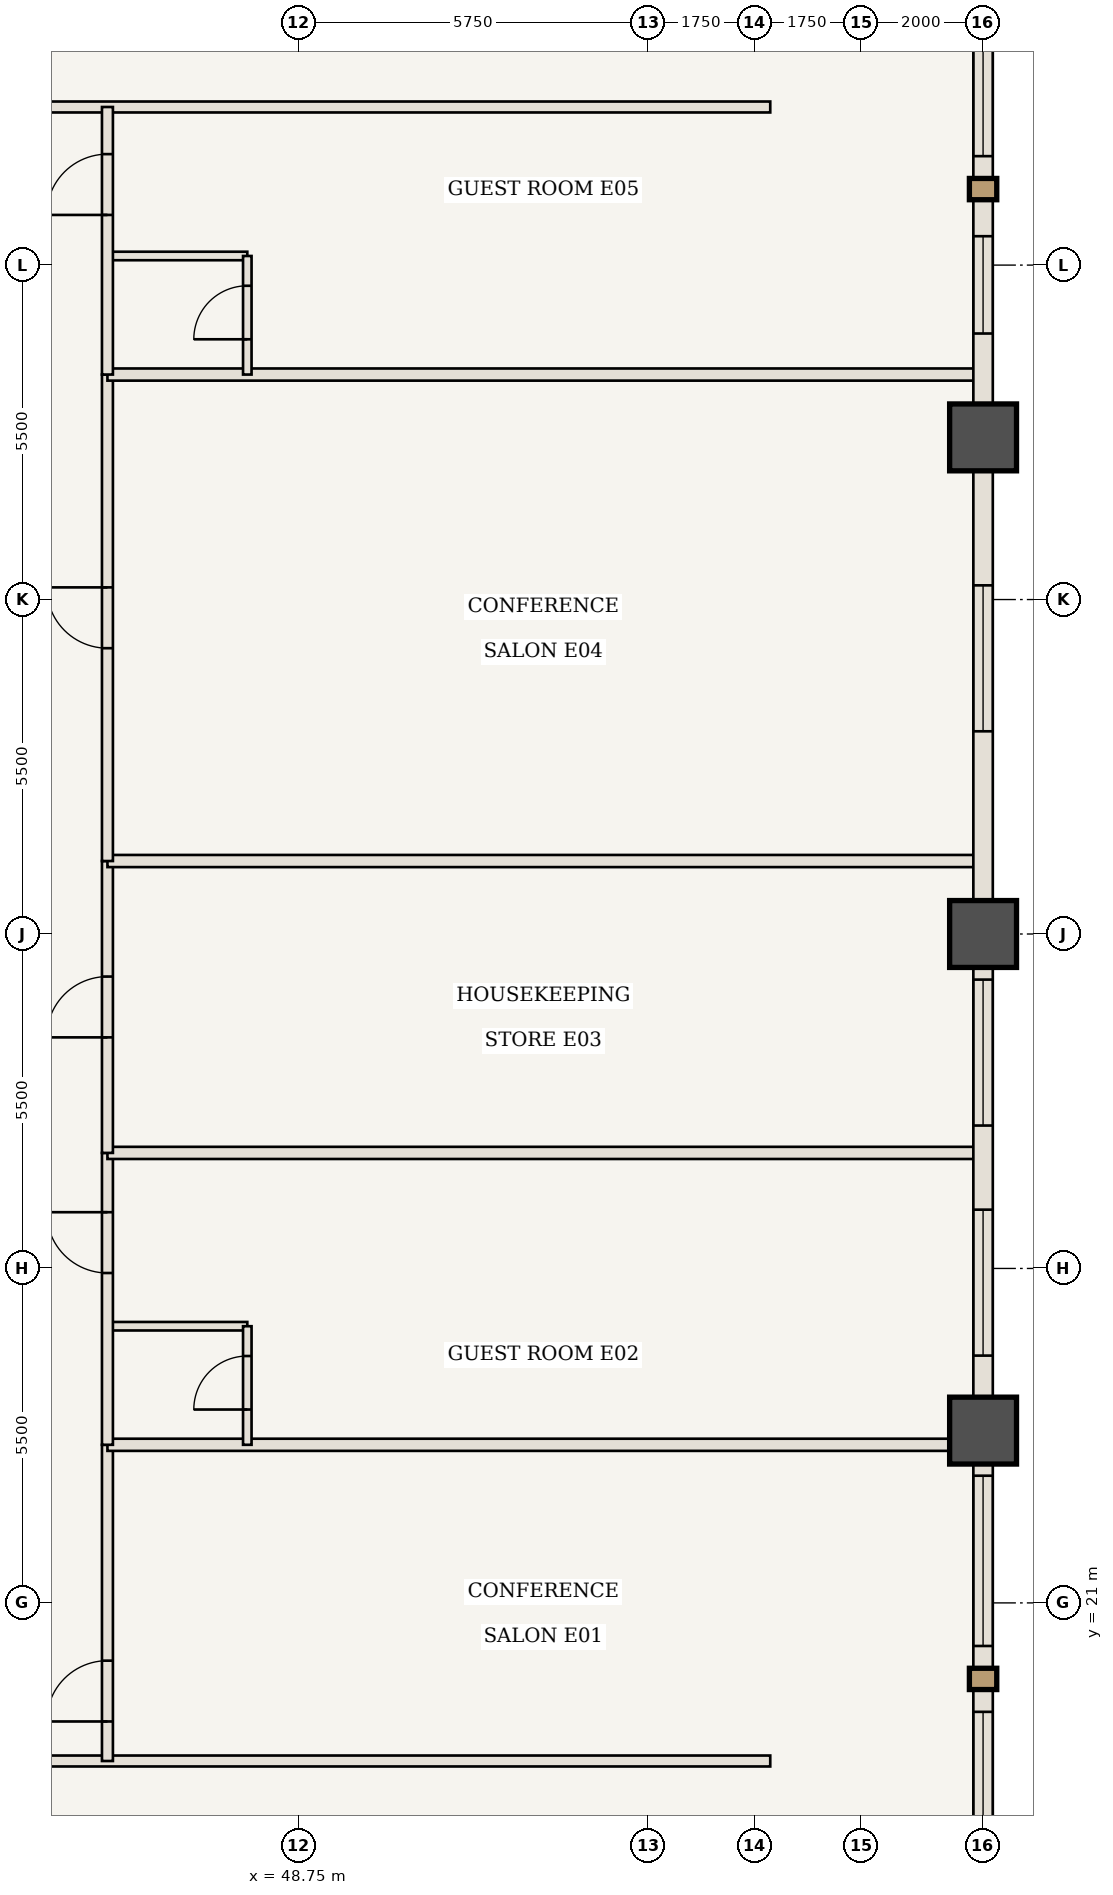
"""IFC4 building model, lengths in metres.
Left out: names, types, materials, properties, quantities, classifications, styles, units other than length and angle.
Written with IfcOpenShell. Run it as: python <this file> out.ifc"""

import sys

from ifc_helpers import new_model, si_unit, direction, frame, frame_2d, origin, origin_2d, place, context, subcontext, project, spatial, rectangle, extrude, element, fill, save


model = new_model("IFC4")
c1 = context("Model", 3, precision=1e-05, world=origin(), true_north=direction((0.0, 1.0)))
c2 = subcontext(c1, "Body", "Model", "MODEL_VIEW")
j1 = project(units=[si_unit("LENGTHUNIT", "METRE"), si_unit("PLANEANGLEUNIT", "RADIAN")], contexts=[c1])
p1 = place(None, origin())
s1 = spatial("IfcSite", under=j1, at=p1, CompositionType="ELEMENT")
p2 = place(p1, origin())
s2 = spatial("IfcBuilding", under=s1, at=p2, CompositionType="ELEMENT")
p3 = place(p2, frame((0.0, 0.0, 42.35)))
s3 = spatial("IfcBuildingStorey", under=s2, at=p3, CompositionType="ELEMENT", Elevation=42.35)
for number, where, z_axis, x_axis in (
    (1, (60.0, 23.833, 0.0), (0.0, 0.0, 1.0), (1.0, 0.0, 0.0)),
    (2, (60.0, 32.0, 0.0), (0.0, 0.0, 1.0), (1.0, 0.0, 0.0)),
    (3, (60.0, 40.167, 0.0), (0.0, 0.0, 1.0), (1.0, 0.0, 0.0)),
):
    element("IfcColumn", number, at=place(p3, frame(where, z_axis=z_axis, x_axis=x_axis)), inside=s3, PredefinedType="COLUMN", context=c2, shape_type="SweptSolid", body=[
        extrude(rectangle(XDim=1.1, YDim=1.1, at=origin_2d()), origin(), (0.0, 0.0, 1.0), 3.5),
    ])
p4 = place(p3, frame((37.9, 18.4, 0.0), z_axis=(0.0, 0.0, 1.0), x_axis=(1.0, 0.0, 0.0)))
e4 = element("IfcWall", 4, at=p4, inside=s3, PredefinedType="STANDARD", context=c2, shape_type="SweptSolid", body=[
    extrude(rectangle(XDim=18.6, YDim=0.18, at=frame_2d((9.3, 0.0))), origin(), (0.0, 0.0, 1.0), 3.32),
])
p5 = place(p4, frame((4.775, 0.0, 0.0)))
e5 = element("IfcOpeningElement", 5, at=p5, cuts=e4, PredefinedType="OPENING", context=c2, shape_type="SweptSolid", body=[
    extrude(rectangle(XDim=1.0, YDim=2.15, at=frame_2d((0.5, 1.075))), frame((0.0, 0.1, 0.0), z_axis=(0.0, -1.0, 0.0), x_axis=(1.0, 0.0, 0.0)), (0.0, 0.0, 1.0), 0.2),
])
p6 = place(p3, frame((38.2, 45.6, 0.0), z_axis=(0.0, 0.0, 1.0), x_axis=(1.0, 0.0, 0.0)))
e6 = element("IfcWall", 6, at=p6, inside=s3, PredefinedType="STANDARD", context=c2, shape_type="SweptSolid", body=[
    extrude(rectangle(XDim=18.3, YDim=0.18, at=frame_2d((9.15, 0.0))), origin(), (0.0, 0.0, 1.0), 3.32),
])
p7 = place(p6, frame((4.625, 0.0, 0.0)))
e7 = element("IfcOpeningElement", 7, at=p7, cuts=e6, PredefinedType="OPENING", context=c2, shape_type="SweptSolid", body=[
    extrude(rectangle(XDim=1.0, YDim=2.15, at=frame_2d((0.5, 1.075))), frame((0.0, 0.1, 0.0), z_axis=(0.0, -1.0, 0.0), x_axis=(1.0, 0.0, 0.0)), (0.0, 0.0, 1.0), 0.2),
])
p8 = place(p3, frame((45.6, 18.4, 0.0), z_axis=(0.0, 0.0, 1.0), x_axis=(0.0, 1.0, 0.0)))
e8 = element("IfcWall", 8, at=p8, inside=s3, PredefinedType="STANDARD", context=c2, shape_type="SweptSolid", body=[
    extrude(rectangle(XDim=5.2, YDim=0.18, at=frame_2d((2.6, 0.0))), origin(), (0.0, 0.0, 1.0), 3.32),
])
p9 = place(p8, frame((0.65, 0.0, 0.0)))
e9 = element("IfcOpeningElement", 9, at=p9, cuts=e8, PredefinedType="OPENING", context=c2, shape_type="SweptSolid", body=[
    extrude(rectangle(XDim=1.0, YDim=2.15, at=frame_2d((0.5, 1.075))), frame((0.0, 0.1, 0.0), z_axis=(0.0, -1.0, 0.0), x_axis=(1.0, 0.0, 0.0)), (0.0, 0.0, 1.0), 0.2),
])
p10 = place(p3, frame((45.6, 23.6, 0.0), z_axis=(0.0, 0.0, 1.0), x_axis=(1.0, 0.0, 0.0)))
e10 = element("IfcWall", 10, at=p10, inside=s3, PredefinedType="STANDARD", context=c2, shape_type="SweptSolid", body=[
    extrude(rectangle(XDim=14.34, YDim=0.2, at=frame_2d((7.17, 0.0))), origin(), (0.0, 0.0, 1.0), 3.32),
])
p11 = place(p3, frame((45.6, 25.55, 0.0), z_axis=(0.0, 0.0, 1.0), x_axis=(1.0, 0.0, 0.0)))
e11 = element("IfcWall", 11, at=p11, inside=s3, PredefinedType="STANDARD", context=c2, shape_type="SweptSolid", body=[
    extrude(rectangle(XDim=2.3, YDim=0.14, at=frame_2d((1.15, 0.0))), origin(), (0.0, 0.0, 1.0), 3.32),
])
p12 = place(p3, frame((47.9, 23.6, 0.0), z_axis=(0.0, 0.0, 1.0), x_axis=(0.0, 1.0, 0.0)))
e12 = element("IfcWall", 12, at=p12, inside=s3, PredefinedType="STANDARD", context=c2, shape_type="SweptSolid", body=[
    extrude(rectangle(XDim=1.95, YDim=0.14, at=frame_2d((0.975, 0.0))), origin(), (0.0, 0.0, 1.0), 3.32),
])
p13 = place(p12, frame((0.58, 0.0, 0.0)))
e13 = element("IfcOpeningElement", 13, at=p13, cuts=e12, PredefinedType="OPENING", context=c2, shape_type="SweptSolid", body=[
    extrude(rectangle(XDim=0.88, YDim=2.1, at=frame_2d((0.44, 1.05))), frame((0.0, 0.08, 0.0), z_axis=(0.0, -1.0, 0.0), x_axis=(1.0, 0.0, 0.0)), (0.0, 0.0, 1.0), 0.16),
])
p14 = place(p3, frame((45.6, 23.6, 0.0), z_axis=(0.0, 0.0, 1.0), x_axis=(0.0, 1.0, 0.0)))
e14 = element("IfcWall", 14, at=p14, inside=s3, PredefinedType="STANDARD", context=c2, shape_type="SweptSolid", body=[
    extrude(rectangle(XDim=4.8, YDim=0.18, at=frame_2d((2.4, 0.0))), origin(), (0.0, 0.0, 1.0), 3.32),
])
p15 = place(p14, frame((2.825, 0.0, 0.0)))
e15 = element("IfcOpeningElement", 15, at=p15, cuts=e14, PredefinedType="OPENING", context=c2, shape_type="SweptSolid", body=[
    extrude(rectangle(XDim=1.0, YDim=2.15, at=frame_2d((0.5, 1.075))), frame((0.0, 0.1, 0.0), z_axis=(0.0, -1.0, 0.0), x_axis=(1.0, 0.0, 0.0)), (0.0, 0.0, 1.0), 0.2),
])
p16 = place(p3, frame((45.6, 28.4, 0.0), z_axis=(0.0, 0.0, 1.0), x_axis=(1.0, 0.0, 0.0)))
e16 = element("IfcWall", 16, at=p16, inside=s3, PredefinedType="STANDARD", context=c2, shape_type="SweptSolid", body=[
    extrude(rectangle(XDim=14.34, YDim=0.2, at=frame_2d((7.17, 0.0))), origin(), (0.0, 0.0, 1.0), 3.32),
])
p17 = place(p3, frame((45.6, 28.4, 0.0), z_axis=(0.0, 0.0, 1.0), x_axis=(0.0, 1.0, 0.0)))
e17 = element("IfcWall", 17, at=p17, inside=s3, PredefinedType="STANDARD", context=c2, shape_type="SweptSolid", body=[
    extrude(rectangle(XDim=4.8, YDim=0.18, at=frame_2d((2.4, 0.0))), origin(), (0.0, 0.0, 1.0), 3.32),
])
p18 = place(p17, frame((1.9, 0.0, 0.0)))
e18 = element("IfcOpeningElement", 18, at=p18, cuts=e17, PredefinedType="OPENING", context=c2, shape_type="SweptSolid", body=[
    extrude(rectangle(XDim=1.0, YDim=2.15, at=frame_2d((0.5, 1.075))), frame((0.0, 0.1, 0.0), z_axis=(0.0, -1.0, 0.0), x_axis=(1.0, 0.0, 0.0)), (0.0, 0.0, 1.0), 0.2),
])
p19 = place(p3, frame((45.6, 33.2, 0.0), z_axis=(0.0, 0.0, 1.0), x_axis=(1.0, 0.0, 0.0)))
e19 = element("IfcWall", 19, at=p19, inside=s3, PredefinedType="STANDARD", context=c2, shape_type="SweptSolid", body=[
    extrude(rectangle(XDim=14.34, YDim=0.2, at=frame_2d((7.17, 0.0))), origin(), (0.0, 0.0, 1.0), 3.32),
])
p20 = place(p3, frame((45.6, 33.2, 0.0), z_axis=(0.0, 0.0, 1.0), x_axis=(0.0, 1.0, 0.0)))
e20 = element("IfcWall", 20, at=p20, inside=s3, PredefinedType="STANDARD", context=c2, shape_type="SweptSolid", body=[
    extrude(rectangle(XDim=8.0, YDim=0.18, at=frame_2d((4.0, 0.0))), origin(), (0.0, 0.0, 1.0), 3.32),
])
p21 = place(p20, frame((3.5, 0.0, 0.0)))
e21 = element("IfcOpeningElement", 21, at=p21, cuts=e20, PredefinedType="OPENING", context=c2, shape_type="SweptSolid", body=[
    extrude(rectangle(XDim=1.0, YDim=2.15, at=frame_2d((0.5, 1.075))), frame((0.0, 0.1, 0.0), z_axis=(0.0, -1.0, 0.0), x_axis=(1.0, 0.0, 0.0)), (0.0, 0.0, 1.0), 0.2),
])
p22 = place(p3, frame((45.6, 41.2, 0.0), z_axis=(0.0, 0.0, 1.0), x_axis=(1.0, 0.0, 0.0)))
e22 = element("IfcWall", 22, at=p22, inside=s3, PredefinedType="STANDARD", context=c2, shape_type="SweptSolid", body=[
    extrude(rectangle(XDim=14.34, YDim=0.2, at=frame_2d((7.17, 0.0))), origin(), (0.0, 0.0, 1.0), 3.32),
])
p23 = place(p3, frame((45.6, 43.15, 0.0), z_axis=(0.0, 0.0, 1.0), x_axis=(1.0, 0.0, 0.0)))
e23 = element("IfcWall", 23, at=p23, inside=s3, PredefinedType="STANDARD", context=c2, shape_type="SweptSolid", body=[
    extrude(rectangle(XDim=2.3, YDim=0.14, at=frame_2d((1.15, 0.0))), origin(), (0.0, 0.0, 1.0), 2.615),
])
p24 = place(p3, frame((47.9, 41.2, 0.0), z_axis=(0.0, 0.0, 1.0), x_axis=(0.0, 1.0, 0.0)))
e24 = element("IfcWall", 24, at=p24, inside=s3, PredefinedType="STANDARD", context=c2, shape_type="SweptSolid", body=[
    extrude(rectangle(XDim=1.95, YDim=0.14, at=frame_2d((0.975, 0.0))), origin(), (0.0, 0.0, 1.0), 3.32),
])
p25 = place(p24, frame((0.58, 0.0, 0.0)))
e25 = element("IfcOpeningElement", 25, at=p25, cuts=e24, PredefinedType="OPENING", context=c2, shape_type="SweptSolid", body=[
    extrude(rectangle(XDim=0.88, YDim=2.1, at=frame_2d((0.44, 1.05))), frame((0.0, 0.08, 0.0), z_axis=(0.0, -1.0, 0.0), x_axis=(1.0, 0.0, 0.0)), (0.0, 0.0, 1.0), 0.16),
])
p26 = place(p3, frame((45.6, 41.2, 0.0), z_axis=(0.0, 0.0, 1.0), x_axis=(0.0, 1.0, 0.0)))
e26 = element("IfcWall", 26, at=p26, inside=s3, PredefinedType="STANDARD", context=c2, shape_type="SweptSolid", body=[
    extrude(rectangle(XDim=4.4, YDim=0.18, at=frame_2d((2.2, 0.0))), origin(), (0.0, 0.0, 1.0), 3.32),
])
p27 = place(p26, frame((2.625, 0.0, 0.0)))
e27 = element("IfcOpeningElement", 27, at=p27, cuts=e26, PredefinedType="OPENING", context=c2, shape_type="SweptSolid", body=[
    extrude(rectangle(XDim=1.0, YDim=2.15, at=frame_2d((0.5, 1.075))), frame((0.0, 0.1, 0.0), z_axis=(0.0, -1.0, 0.0), x_axis=(1.0, 0.0, 0.0)), (0.0, 0.0, 1.0), 0.2),
])
p28 = place(p3, frame((60.0, 23.833, 0.0), z_axis=(0.0, 0.0, 1.0), x_axis=(0.0, -1.0, 0.0)))
e28 = element("IfcWall", 28, at=p28, inside=s3, PredefinedType="USERDEFINED", context=c2, shape_type="SweptSolid", body=[
    extrude(rectangle(XDim=8.167, YDim=0.32, at=frame_2d((4.083, 0.0))), origin(), (0.0, 0.0, 1.0), 2.52),
])
p29 = place(p28, frame((0.742, 0.0, 0.85)))
e29 = element("IfcOpeningElement", 29, at=p29, cuts=e28, PredefinedType="OPENING", context=c2, shape_type="SweptSolid", body=[
    extrude(rectangle(XDim=2.8, YDim=1.47, at=frame_2d((1.4, 0.735))), frame((0.0, 0.17, 0.0), z_axis=(0.0, -1.0, 0.0), x_axis=(1.0, 0.0, 0.0)), (0.0, 0.0, 1.0), 0.34),
])
p30 = place(p28, frame((4.625, 0.0, 0.85)))
e30 = element("IfcOpeningElement", 30, at=p30, cuts=e28, PredefinedType="OPENING", context=c2, shape_type="SweptSolid", body=[
    extrude(rectangle(XDim=2.8, YDim=1.47, at=frame_2d((1.4, 0.735))), frame((0.0, 0.17, 0.0), z_axis=(0.0, -1.0, 0.0), x_axis=(1.0, 0.0, 0.0)), (0.0, 0.0, 1.0), 0.34),
])
p31 = place(p3, frame((60.0, 32.0, 0.0), z_axis=(0.0, 0.0, 1.0), x_axis=(0.0, -1.0, 0.0)))
e31 = element("IfcWall", 31, at=p31, inside=s3, PredefinedType="USERDEFINED", context=c2, shape_type="SweptSolid", body=[
    extrude(rectangle(XDim=8.167, YDim=0.32, at=frame_2d((4.083, 0.0))), origin(), (0.0, 0.0, 1.0), 2.52),
])
p32 = place(p31, frame((0.75, 0.0, 0.85)))
e32 = element("IfcOpeningElement", 32, at=p32, cuts=e31, PredefinedType="OPENING", context=c2, shape_type="SweptSolid", body=[
    extrude(rectangle(XDim=2.4, YDim=1.47, at=frame_2d((1.2, 0.735))), frame((0.0, 0.17, 0.0), z_axis=(0.0, -1.0, 0.0), x_axis=(1.0, 0.0, 0.0)), (0.0, 0.0, 1.0), 0.34),
])
p33 = place(p31, frame((4.533, 0.0, 0.85)))
e33 = element("IfcOpeningElement", 33, at=p33, cuts=e31, PredefinedType="OPENING", context=c2, shape_type="SweptSolid", body=[
    extrude(rectangle(XDim=2.4, YDim=1.47, at=frame_2d((1.2, 0.735))), frame((0.0, 0.17, 0.0), z_axis=(0.0, -1.0, 0.0), x_axis=(1.0, 0.0, 0.0)), (0.0, 0.0, 1.0), 0.34),
])
p34 = place(p3, frame((60.0, 40.167, 0.0), z_axis=(0.0, 0.0, 1.0), x_axis=(0.0, -1.0, 0.0)))
e34 = element("IfcWall", 34, at=p34, inside=s3, PredefinedType="USERDEFINED", context=c2, shape_type="SweptSolid", body=[
    extrude(rectangle(XDim=8.167, YDim=0.32, at=frame_2d((4.083, 0.0))), origin(), (0.0, 0.0, 1.0), 2.52),
])
p35 = place(p34, frame((2.433, 0.0, 0.85)))
e35 = element("IfcOpeningElement", 35, at=p35, cuts=e34, PredefinedType="OPENING", context=c2, shape_type="SweptSolid", body=[
    extrude(rectangle(XDim=2.4, YDim=1.47, at=frame_2d((1.2, 0.735))), frame((0.0, 0.17, 0.0), z_axis=(0.0, -1.0, 0.0), x_axis=(1.0, 0.0, 0.0)), (0.0, 0.0, 1.0), 0.34),
])
p36 = place(p3, frame((60.0, 48.333, 0.0), z_axis=(0.0, 0.0, 1.0), x_axis=(0.0, -1.0, 0.0)))
e36 = element("IfcWall", 36, at=p36, inside=s3, PredefinedType="USERDEFINED", context=c2, shape_type="SweptSolid", body=[
    extrude(rectangle(XDim=8.167, YDim=0.32, at=frame_2d((4.083, 0.0))), origin(), (0.0, 0.0, 1.0), 2.52),
])
p37 = place(p36, frame((0.742, 0.0, 0.85)))
e37 = element("IfcOpeningElement", 37, at=p37, cuts=e36, PredefinedType="OPENING", context=c2, shape_type="SweptSolid", body=[
    extrude(rectangle(XDim=2.8, YDim=1.47, at=frame_2d((1.4, 0.735))), frame((0.0, 0.17, 0.0), z_axis=(0.0, -1.0, 0.0), x_axis=(1.0, 0.0, 0.0)), (0.0, 0.0, 1.0), 0.34),
])
p38 = place(p36, frame((4.858, 0.0, 0.85)))
e38 = element("IfcOpeningElement", 38, at=p38, cuts=e36, PredefinedType="OPENING", context=c2, shape_type="SweptSolid", body=[
    extrude(rectangle(XDim=1.6, YDim=1.47, at=frame_2d((0.8, 0.735))), frame((0.0, 0.17, 0.0), z_axis=(0.0, -1.0, 0.0), x_axis=(1.0, 0.0, 0.0)), (0.0, 0.0, 1.0), 0.34),
])
p39 = place(p9, origin())
e39 = element("IfcDoor", 39, at=p39, inside=s3, OperationType="SINGLE_SWING_LEFT", PredefinedType="DOOR", context=c2, shape_type="SweptSolid", body=[
    extrude(rectangle(XDim=1.0, YDim=2.15, at=frame_2d((0.5, 1.075))), frame((0.0, 0.025, 0.0), z_axis=(0.0, -1.0, 0.0), x_axis=(1.0, 0.0, 0.0)), (0.0, 0.0, 1.0), 0.05),
])
fill(e9, e39)
p40 = place(p13, origin())
e40 = element("IfcDoor", 40, at=p40, inside=s3, OperationType="SINGLE_SWING_LEFT", PredefinedType="DOOR", context=c2, shape_type="SweptSolid", body=[
    extrude(rectangle(XDim=0.88, YDim=2.1, at=frame_2d((0.44, 1.05))), frame((0.0, 0.025, 0.0), z_axis=(0.0, -1.0, 0.0), x_axis=(1.0, 0.0, 0.0)), (0.0, 0.0, 1.0), 0.05),
])
fill(e13, e40)
p41 = place(p15, origin())
e41 = element("IfcDoor", 41, at=p41, inside=s3, OperationType="SINGLE_SWING_RIGHT", PredefinedType="DOOR", context=c2, shape_type="SweptSolid", body=[
    extrude(rectangle(XDim=1.0, YDim=2.15, at=frame_2d((0.5, 1.075))), frame((0.0, 0.025, 0.0), z_axis=(0.0, -1.0, 0.0), x_axis=(1.0, 0.0, 0.0)), (0.0, 0.0, 1.0), 0.05),
])
fill(e15, e41)
p42 = place(p18, origin())
e42 = element("IfcDoor", 42, at=p42, inside=s3, OperationType="SINGLE_SWING_LEFT", PredefinedType="DOOR", context=c2, shape_type="SweptSolid", body=[
    extrude(rectangle(XDim=1.0, YDim=2.15, at=frame_2d((0.5, 1.075))), frame((0.0, 0.025, 0.0), z_axis=(0.0, -1.0, 0.0), x_axis=(1.0, 0.0, 0.0)), (0.0, 0.0, 1.0), 0.05),
])
fill(e18, e42)
p43 = place(p21, origin())
e43 = element("IfcDoor", 43, at=p43, inside=s3, OperationType="SINGLE_SWING_RIGHT", PredefinedType="DOOR", context=c2, shape_type="SweptSolid", body=[
    extrude(rectangle(XDim=1.0, YDim=2.15, at=frame_2d((0.5, 1.075))), frame((0.0, 0.025, 0.0), z_axis=(0.0, -1.0, 0.0), x_axis=(1.0, 0.0, 0.0)), (0.0, 0.0, 1.0), 0.05),
])
fill(e21, e43)
p44 = place(p25, origin())
e44 = element("IfcDoor", 44, at=p44, inside=s3, OperationType="SINGLE_SWING_LEFT", PredefinedType="DOOR", context=c2, shape_type="SweptSolid", body=[
    extrude(rectangle(XDim=0.88, YDim=2.1, at=frame_2d((0.44, 1.05))), frame((0.0, 0.025, 0.0), z_axis=(0.0, -1.0, 0.0), x_axis=(1.0, 0.0, 0.0)), (0.0, 0.0, 1.0), 0.05),
])
fill(e25, e44)
p45 = place(p27, origin())
e45 = element("IfcDoor", 45, at=p45, inside=s3, OperationType="SINGLE_SWING_LEFT", PredefinedType="DOOR", context=c2, shape_type="SweptSolid", body=[
    extrude(rectangle(XDim=1.0, YDim=2.15, at=frame_2d((0.5, 1.075))), frame((0.0, 0.025, 0.0), z_axis=(0.0, -1.0, 0.0), x_axis=(1.0, 0.0, 0.0)), (0.0, 0.0, 1.0), 0.05),
])
fill(e27, e45)
p46 = place(p29, origin())
e46 = element("IfcWindow", 46, at=p46, inside=s3, PartitioningType="SINGLE_PANEL", PredefinedType="WINDOW", context=c2, shape_type="SweptSolid", body=[
    extrude(rectangle(XDim=2.8, YDim=1.47, at=frame_2d((1.4, 0.735))), frame((0.0, 0.03, 0.0), z_axis=(0.0, -1.0, 0.0), x_axis=(1.0, 0.0, 0.0)), (0.0, 0.0, 1.0), 0.06),
])
fill(e29, e46)
p47 = place(p30, origin())
e47 = element("IfcWindow", 47, at=p47, inside=s3, PartitioningType="SINGLE_PANEL", PredefinedType="WINDOW", context=c2, shape_type="SweptSolid", body=[
    extrude(rectangle(XDim=2.8, YDim=1.47, at=frame_2d((1.4, 0.735))), frame((0.0, 0.03, 0.0), z_axis=(0.0, -1.0, 0.0), x_axis=(1.0, 0.0, 0.0)), (0.0, 0.0, 1.0), 0.06),
])
fill(e30, e47)
p48 = place(p32, origin())
e48 = element("IfcWindow", 48, at=p48, inside=s3, PartitioningType="SINGLE_PANEL", PredefinedType="WINDOW", context=c2, shape_type="SweptSolid", body=[
    extrude(rectangle(XDim=2.4, YDim=1.47, at=frame_2d((1.2, 0.735))), frame((0.0, 0.03, 0.0), z_axis=(0.0, -1.0, 0.0), x_axis=(1.0, 0.0, 0.0)), (0.0, 0.0, 1.0), 0.06),
])
fill(e32, e48)
p49 = place(p33, origin())
e49 = element("IfcWindow", 49, at=p49, inside=s3, PartitioningType="SINGLE_PANEL", PredefinedType="WINDOW", context=c2, shape_type="SweptSolid", body=[
    extrude(rectangle(XDim=2.4, YDim=1.47, at=frame_2d((1.2, 0.735))), frame((0.0, 0.03, 0.0), z_axis=(0.0, -1.0, 0.0), x_axis=(1.0, 0.0, 0.0)), (0.0, 0.0, 1.0), 0.06),
])
fill(e33, e49)
p50 = place(p35, origin())
e50 = element("IfcWindow", 50, at=p50, inside=s3, PartitioningType="SINGLE_PANEL", PredefinedType="WINDOW", context=c2, shape_type="SweptSolid", body=[
    extrude(rectangle(XDim=2.4, YDim=1.47, at=frame_2d((1.2, 0.735))), frame((0.0, 0.03, 0.0), z_axis=(0.0, -1.0, 0.0), x_axis=(1.0, 0.0, 0.0)), (0.0, 0.0, 1.0), 0.06),
])
fill(e35, e50)
p51 = place(p37, origin())
e51 = element("IfcWindow", 51, at=p51, inside=s3, PartitioningType="SINGLE_PANEL", PredefinedType="WINDOW", context=c2, shape_type="SweptSolid", body=[
    extrude(rectangle(XDim=2.8, YDim=1.47, at=frame_2d((1.4, 0.735))), frame((0.0, 0.03, 0.0), z_axis=(0.0, -1.0, 0.0), x_axis=(1.0, 0.0, 0.0)), (0.0, 0.0, 1.0), 0.06),
])
fill(e37, e51)
p52 = place(p38, origin())
e52 = element("IfcWindow", 52, at=p52, inside=s3, PartitioningType="SINGLE_PANEL", PredefinedType="WINDOW", context=c2, shape_type="SweptSolid", body=[
    extrude(rectangle(XDim=1.6, YDim=1.47, at=frame_2d((0.8, 0.735))), frame((0.0, 0.03, 0.0), z_axis=(0.0, -1.0, 0.0), x_axis=(1.0, 0.0, 0.0)), (0.0, 0.0, 1.0), 0.06),
])
fill(e38, e52)
save(model, sys.argv[1])
